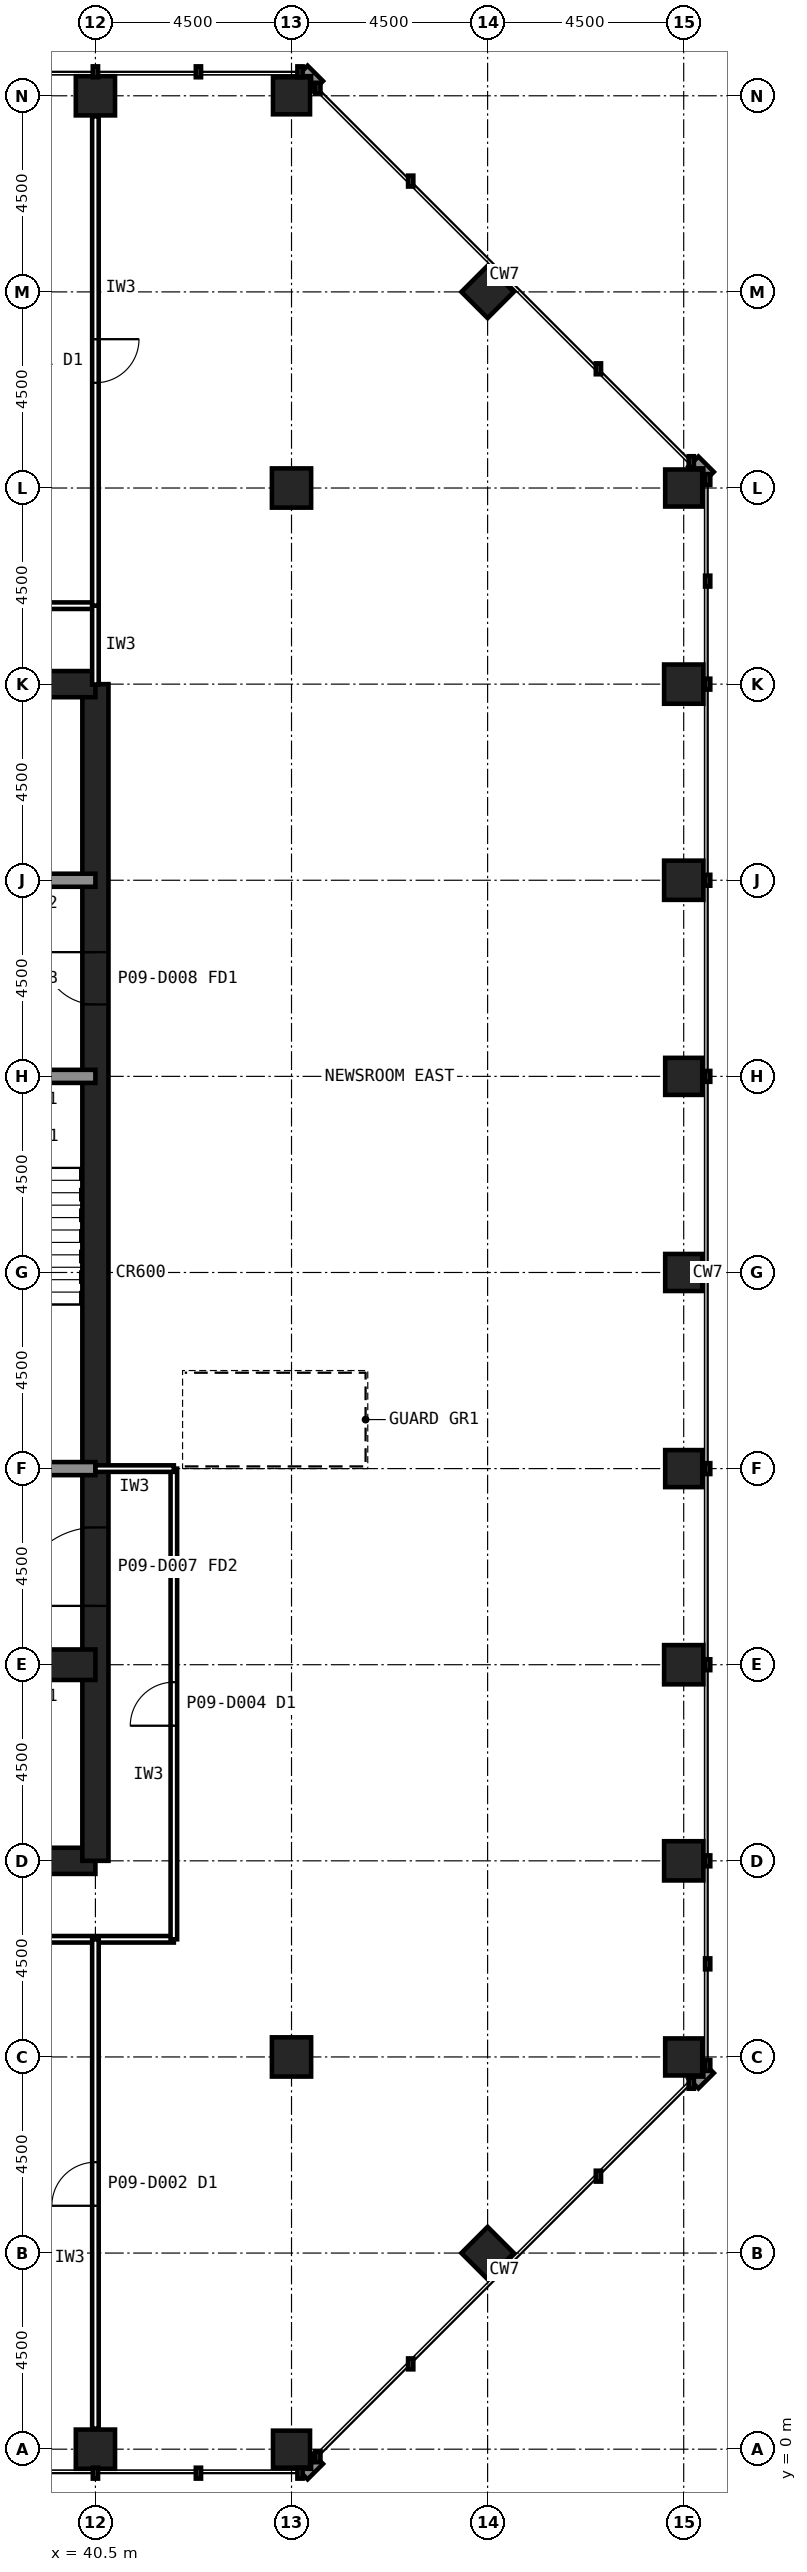
"""IFC4 building model, lengths in metres.
Left out: names, types, materials, properties, quantities, classifications, styles, units other than length and angle.
Written with IfcOpenShell. Run it as: python <this file> out.ifc"""

import sys

from ifc_helpers import new_model, si_unit, direction, frame, frame_2d, origin, origin_2d, place, context, subcontext, project, spatial, rectangle, hollow_rectangle, extrude, element, fill, save


model = new_model("IFC4")
c1 = context("Model", 3, precision=1e-05, world=origin(), true_north=direction((0.0, 1.0)))
c2 = subcontext(c1, "Body", "Model", "MODEL_VIEW")
j1 = project(units=[si_unit("LENGTHUNIT", "METRE"), si_unit("PLANEANGLEUNIT", "RADIAN")], contexts=[c1])
p1 = place(None, origin())
s1 = spatial("IfcSite", under=j1, at=p1, CompositionType="ELEMENT")
p2 = place(p1, origin())
s2 = spatial("IfcBuilding", under=s1, at=p2, CompositionType="ELEMENT")
p3 = place(p2, frame((0.0, 0.0, 41.6)))
s3 = spatial("IfcBuildingStorey", under=s2, at=p3, CompositionType="ELEMENT", Elevation=41.6)
p4 = place(p3, frame((40.5, 0.0, 0.0), z_axis=(0.0, 0.0, 1.0), x_axis=(1.0, 0.0, 0.0)))
e1 = element("IfcColumn", 1, at=p4, inside=s3, PredefinedType="COLUMN", context=c2, shape_type="SweptSolid", body=[
    extrude(hollow_rectangle(XDim=0.9, YDim=0.9, WallThickness=0.063, at=origin_2d()), origin(), (0.0, 0.0, 1.0), 4.2),
])
for number, where, z_axis, x_axis in (
    (2, (45.0, 0.0, 0.0), (0.0, 0.0, 1.0), (1.0, 0.0, 0.0)),
    (3, (54.0, 9.0, 0.0), (0.0, 0.0, 1.0), (1.0, 0.0, 0.0)),
):
    element("IfcColumn", number, at=place(p3, frame(where, z_axis=z_axis, x_axis=x_axis)), inside=s3, PredefinedType="COLUMN", context=c2, shape_type="SweptSolid", body=[
        extrude(hollow_rectangle(XDim=0.85, YDim=0.85, WallThickness=0.05, at=origin_2d()), origin(), (0.0, 0.0, 1.0), 4.2),
    ])
for number, where, z_axis, x_axis in (
    (4, (54.0, 13.5, 0.0), (0.0, 0.0, 1.0), (1.0, 0.0, 0.0)),
    (5, (54.0, 18.0, 0.0), (0.0, 0.0, 1.0), (1.0, 0.0, 0.0)),
):
    element("IfcColumn", number, at=place(p3, frame(where, z_axis=z_axis, x_axis=x_axis)), inside=s3, PredefinedType="COLUMN", context=c2, shape_type="SweptSolid", body=[
        extrude(hollow_rectangle(XDim=0.9, YDim=0.9, WallThickness=0.063, at=origin_2d()), origin(), (0.0, 0.0, 1.0), 4.2),
    ])
for number, where, z_axis, x_axis in (
    (6, (54.0, 22.5, 0.0), (0.0, 0.0, 1.0), (1.0, 0.0, 0.0)),
    (7, (54.0, 27.0, 0.0), (0.0, 0.0, 1.0), (1.0, 0.0, 0.0)),
    (8, (54.0, 31.5, 0.0), (0.0, 0.0, 1.0), (1.0, 0.0, 0.0)),
):
    element("IfcColumn", number, at=place(p3, frame(where, z_axis=z_axis, x_axis=x_axis)), inside=s3, PredefinedType="COLUMN", context=c2, shape_type="SweptSolid", body=[
        extrude(hollow_rectangle(XDim=0.85, YDim=0.85, WallThickness=0.05, at=origin_2d()), origin(), (0.0, 0.0, 1.0), 4.2),
    ])
for number, where, z_axis, x_axis in (
    (9, (54.0, 36.0, 0.0), (0.0, 0.0, 1.0), (1.0, 0.0, 0.0)),
    (10, (54.0, 40.5, 0.0), (0.0, 0.0, 1.0), (1.0, 0.0, 0.0)),
):
    element("IfcColumn", number, at=place(p3, frame(where, z_axis=z_axis, x_axis=x_axis)), inside=s3, PredefinedType="COLUMN", context=c2, shape_type="SweptSolid", body=[
        extrude(hollow_rectangle(XDim=0.9, YDim=0.9, WallThickness=0.063, at=origin_2d()), origin(), (0.0, 0.0, 1.0), 4.2),
    ])
for number, where, z_axis, x_axis in (
    (11, (54.0, 45.0, 0.0), (0.0, 0.0, 1.0), (1.0, 0.0, 0.0)),
    (12, (45.0, 54.0, 0.0), (0.0, 0.0, 1.0), (1.0, 0.0, 0.0)),
):
    element("IfcColumn", number, at=place(p3, frame(where, z_axis=z_axis, x_axis=x_axis)), inside=s3, PredefinedType="COLUMN", context=c2, shape_type="SweptSolid", body=[
        extrude(hollow_rectangle(XDim=0.85, YDim=0.85, WallThickness=0.05, at=origin_2d()), origin(), (0.0, 0.0, 1.0), 4.2),
    ])
p5 = place(p3, frame((40.5, 54.0, 0.0), z_axis=(0.0, 0.0, 1.0), x_axis=(1.0, 0.0, 0.0)))
e13 = element("IfcColumn", 13, at=p5, inside=s3, PredefinedType="COLUMN", context=c2, shape_type="SweptSolid", body=[
    extrude(hollow_rectangle(XDim=0.9, YDim=0.9, WallThickness=0.063, at=origin_2d()), origin(), (0.0, 0.0, 1.0), 4.2),
])
for number, where, z_axis, x_axis in (
    (14, (49.5, 4.5, 0.0), (0.0, 0.0, 1.0), (0.707, 0.707, 0.0)),
    (15, (49.5, 49.5, 0.0), (0.0, 0.0, 1.0), (0.707, 0.707, 0.0)),
):
    element("IfcColumn", number, at=place(p3, frame(where, z_axis=z_axis, x_axis=x_axis)), inside=s3, PredefinedType="COLUMN", context=c2, shape_type="SweptSolid", body=[
        extrude(hollow_rectangle(XDim=0.85, YDim=0.85, WallThickness=0.05, at=origin_2d()), origin(), (0.0, 0.0, 1.0), 4.2),
    ])
for number, where, z_axis, x_axis in (
    (16, (45.0, 9.0, 0.0), (0.0, 0.0, 1.0), (1.0, 0.0, 0.0)),
    (17, (45.0, 45.0, 0.0), (0.0, 0.0, 1.0), (1.0, 0.0, 0.0)),
):
    element("IfcColumn", number, at=place(p3, frame(where, z_axis=z_axis, x_axis=x_axis)), inside=s3, PredefinedType="COLUMN", context=c2, shape_type="SweptSolid", body=[
        extrude(hollow_rectangle(XDim=0.9, YDim=0.9, WallThickness=0.063, at=origin_2d()), origin(), (0.0, 0.0, 1.0), 4.2),
    ])
p6 = place(p3, frame((13.5, 13.5, 0.0), z_axis=(0.0, 0.0, 1.0), x_axis=(1.0, 0.0, 0.0)))
e18 = element("IfcWall", 18, at=p6, inside=s3, PredefinedType="SHEAR", context=c2, shape_type="SweptSolid", body=[
    extrude(rectangle(XDim=27.0, YDim=0.6, at=frame_2d((13.5, 0.0))), origin(), (0.0, 0.0, 1.0), 4.2),
])
p7 = place(p3, frame((40.5, 13.5, 0.0), z_axis=(0.0, 0.0, 1.0), x_axis=(0.0, 1.0, 0.0)))
e19 = element("IfcWall", 19, at=p7, inside=s3, PredefinedType="SHEAR", context=c2, shape_type="SweptSolid", body=[
    extrude(rectangle(XDim=27.0, YDim=0.6, at=frame_2d((13.5, 0.0))), origin(), (0.0, 0.0, 1.0), 4.2),
])
p8 = place(p7, frame((5.85, 0.0, 0.0)))
e20 = element("IfcOpeningElement", 20, at=p8, cuts=e19, PredefinedType="OPENING", context=c2, shape_type="SweptSolid", body=[
    extrude(rectangle(XDim=1.8, YDim=2.1, at=frame_2d((0.9, 1.05))), frame((0.0, 0.31, 0.0), z_axis=(0.0, -1.0, 0.0), x_axis=(1.0, 0.0, 0.0)), (0.0, 0.0, 1.0), 0.62),
])
p9 = place(p7, frame((19.65, 0.0, 0.0)))
e21 = element("IfcOpeningElement", 21, at=p9, cuts=e19, PredefinedType="OPENING", context=c2, shape_type="SweptSolid", body=[
    extrude(rectangle(XDim=1.2, YDim=2.1, at=frame_2d((0.6, 1.05))), frame((0.0, 0.31, 0.0), z_axis=(0.0, -1.0, 0.0), x_axis=(1.0, 0.0, 0.0)), (0.0, 0.0, 1.0), 0.62),
])
p10 = place(p3, frame((40.5, 40.5, 0.0), z_axis=(0.0, 0.0, 1.0), x_axis=(-1.0, 0.0, 0.0)))
e22 = element("IfcWall", 22, at=p10, inside=s3, PredefinedType="SHEAR", context=c2, shape_type="SweptSolid", body=[
    extrude(rectangle(XDim=27.0, YDim=0.6, at=frame_2d((13.5, 0.0))), origin(), (0.0, 0.0, 1.0), 4.2),
])
p11 = place(p3, frame((13.5, 18.0, 0.0), z_axis=(0.0, 0.0, 1.0), x_axis=(1.0, 0.0, 0.0)))
e23 = element("IfcWall", 23, at=p11, inside=s3, PredefinedType="SHEAR", context=c2, shape_type="SweptSolid", body=[
    extrude(rectangle(XDim=27.0, YDim=0.7, at=frame_2d((13.5, 0.0))), origin(), (0.0, 0.0, 1.0), 4.2),
])
p12 = place(p11, frame((24.3, 0.0, 0.0)))
e24 = element("IfcOpeningElement", 24, at=p12, cuts=e23, PredefinedType="OPENING", context=c2, shape_type="SweptSolid", body=[
    extrude(rectangle(XDim=0.9, YDim=2.1, at=frame_2d((0.45, 1.05))), frame((0.0, 0.36, 0.0), z_axis=(0.0, -1.0, 0.0), x_axis=(1.0, 0.0, 0.0)), (0.0, 0.0, 1.0), 0.72),
])
p13 = place(p11, frame((5.45, 0.0, 0.0)))
e25 = element("IfcOpeningElement", 25, at=p13, cuts=e23, PredefinedType="OPENING", context=c2, shape_type="SweptSolid", body=[
    extrude(rectangle(XDim=1.1, YDim=2.1, at=frame_2d((0.55, 1.05))), frame((0.0, 0.36, 0.0), z_axis=(0.0, -1.0, 0.0), x_axis=(1.0, 0.0, 0.0)), (0.0, 0.0, 1.0), 0.72),
])
p14 = place(p11, frame((8.45, 0.0, 0.0)))
e26 = element("IfcOpeningElement", 26, at=p14, cuts=e23, PredefinedType="OPENING", context=c2, shape_type="SweptSolid", body=[
    extrude(rectangle(XDim=1.1, YDim=2.1, at=frame_2d((0.55, 1.05))), frame((0.0, 0.36, 0.0), z_axis=(0.0, -1.0, 0.0), x_axis=(1.0, 0.0, 0.0)), (0.0, 0.0, 1.0), 0.72),
])
p15 = place(p11, frame((11.45, 0.0, 0.0)))
e27 = element("IfcOpeningElement", 27, at=p15, cuts=e23, PredefinedType="OPENING", context=c2, shape_type="SweptSolid", body=[
    extrude(rectangle(XDim=1.1, YDim=2.1, at=frame_2d((0.55, 1.05))), frame((0.0, 0.36, 0.0), z_axis=(0.0, -1.0, 0.0), x_axis=(1.0, 0.0, 0.0)), (0.0, 0.0, 1.0), 0.72),
])
p16 = place(p11, frame((14.45, 0.0, 0.0)))
e28 = element("IfcOpeningElement", 28, at=p16, cuts=e23, PredefinedType="OPENING", context=c2, shape_type="SweptSolid", body=[
    extrude(rectangle(XDim=1.1, YDim=2.1, at=frame_2d((0.55, 1.05))), frame((0.0, 0.36, 0.0), z_axis=(0.0, -1.0, 0.0), x_axis=(1.0, 0.0, 0.0)), (0.0, 0.0, 1.0), 0.72),
])
p17 = place(p11, frame((17.45, 0.0, 0.0)))
e29 = element("IfcOpeningElement", 29, at=p17, cuts=e23, PredefinedType="OPENING", context=c2, shape_type="SweptSolid", body=[
    extrude(rectangle(XDim=1.1, YDim=2.1, at=frame_2d((0.55, 1.05))), frame((0.0, 0.36, 0.0), z_axis=(0.0, -1.0, 0.0), x_axis=(1.0, 0.0, 0.0)), (0.0, 0.0, 1.0), 0.72),
])
p18 = place(p11, frame((20.45, 0.0, 0.0)))
e30 = element("IfcOpeningElement", 30, at=p18, cuts=e23, PredefinedType="OPENING", context=c2, shape_type="SweptSolid", body=[
    extrude(rectangle(XDim=1.1, YDim=2.1, at=frame_2d((0.55, 1.05))), frame((0.0, 0.36, 0.0), z_axis=(0.0, -1.0, 0.0), x_axis=(1.0, 0.0, 0.0)), (0.0, 0.0, 1.0), 0.72),
])
p19 = place(p11, frame((1.6, 0.0, 0.0)))
e31 = element("IfcOpeningElement", 31, at=p19, cuts=e23, PredefinedType="OPENING", context=c2, shape_type="SweptSolid", body=[
    extrude(rectangle(XDim=1.3, YDim=2.2, at=frame_2d((0.65, 1.1))), frame((0.0, 0.36, 0.0), z_axis=(0.0, -1.0, 0.0), x_axis=(1.0, 0.0, 0.0)), (0.0, 0.0, 1.0), 0.72),
])
p20 = place(p3, frame((13.5, 36.0, 0.0), z_axis=(0.0, 0.0, 1.0), x_axis=(1.0, 0.0, 0.0)))
e32 = element("IfcWall", 32, at=p20, inside=s3, PredefinedType="SOLIDWALL", context=c2, shape_type="SweptSolid", body=[
    extrude(rectangle(XDim=27.0, YDim=0.3, at=frame_2d((13.5, 0.0))), origin(), (0.0, 0.0, 1.0), 4.04),
])
p21 = place(p20, frame((1.8, 0.0, 0.0)))
e33 = element("IfcOpeningElement", 33, at=p21, cuts=e32, PredefinedType="OPENING", context=c2, shape_type="SweptSolid", body=[
    extrude(rectangle(XDim=0.9, YDim=2.1, at=frame_2d((0.45, 1.05))), frame((0.0, 0.16, 0.0), z_axis=(0.0, -1.0, 0.0), x_axis=(1.0, 0.0, 0.0)), (0.0, 0.0, 1.0), 0.32),
])
p22 = place(p20, frame((24.1, 0.0, 0.0)))
e34 = element("IfcOpeningElement", 34, at=p22, cuts=e32, PredefinedType="OPENING", context=c2, shape_type="SweptSolid", body=[
    extrude(rectangle(XDim=1.3, YDim=2.2, at=frame_2d((0.65, 1.1))), frame((0.0, 0.16, 0.0), z_axis=(0.0, -1.0, 0.0), x_axis=(1.0, 0.0, 0.0)), (0.0, 0.0, 1.0), 0.32),
])
p23 = place(p3, frame((13.5, 22.5, 0.0), z_axis=(0.0, 0.0, 1.0), x_axis=(1.0, 0.0, 0.0)))
e35 = element("IfcWall", 35, at=p23, inside=s3, PredefinedType="SOLIDWALL", context=c2, shape_type="SweptSolid", body=[
    extrude(rectangle(XDim=27.0, YDim=0.3, at=frame_2d((13.5, 0.0))), origin(), (0.0, 0.0, 1.0), 4.04),
])
p24 = place(p23, frame((1.65, 0.0, 0.0)))
e36 = element("IfcOpeningElement", 36, at=p24, cuts=e35, PredefinedType="OPENING", context=c2, shape_type="SweptSolid", body=[
    extrude(rectangle(XDim=1.2, YDim=2.1, at=frame_2d((0.6, 1.05))), frame((0.0, 0.16, 0.0), z_axis=(0.0, -1.0, 0.0), x_axis=(1.0, 0.0, 0.0)), (0.0, 0.0, 1.0), 0.32),
])
p25 = place(p23, frame((6.025, 0.0, 0.0)))
e37 = element("IfcOpeningElement", 37, at=p25, cuts=e35, PredefinedType="OPENING", context=c2, shape_type="SweptSolid", body=[
    extrude(rectangle(XDim=1.0, YDim=2.1, at=frame_2d((0.5, 1.05))), frame((0.0, 0.16, 0.0), z_axis=(0.0, -1.0, 0.0), x_axis=(1.0, 0.0, 0.0)), (0.0, 0.0, 1.0), 0.32),
])
p26 = place(p23, frame((10.525, 0.0, 0.0)))
e38 = element("IfcOpeningElement", 38, at=p26, cuts=e35, PredefinedType="OPENING", context=c2, shape_type="SweptSolid", body=[
    extrude(rectangle(XDim=1.0, YDim=2.1, at=frame_2d((0.5, 1.05))), frame((0.0, 0.16, 0.0), z_axis=(0.0, -1.0, 0.0), x_axis=(1.0, 0.0, 0.0)), (0.0, 0.0, 1.0), 0.32),
])
p27 = place(p23, frame((19.75, 0.0, 0.0)))
e39 = element("IfcOpeningElement", 39, at=p27, cuts=e35, PredefinedType="OPENING", context=c2, shape_type="SweptSolid", body=[
    extrude(rectangle(XDim=1.0, YDim=2.1, at=frame_2d((0.5, 1.05))), frame((0.0, 0.16, 0.0), z_axis=(0.0, -1.0, 0.0), x_axis=(1.0, 0.0, 0.0)), (0.0, 0.0, 1.0), 0.32),
])
p28 = place(p23, frame((15.05, 0.0, 0.0)))
e40 = element("IfcOpeningElement", 40, at=p28, cuts=e35, PredefinedType="OPENING", context=c2, shape_type="SweptSolid", body=[
    extrude(rectangle(XDim=1.4, YDim=2.4, at=frame_2d((0.7, 1.2))), frame((0.0, 0.16, 0.0), z_axis=(0.0, -1.0, 0.0), x_axis=(1.0, 0.0, 0.0)), (0.0, 0.0, 1.0), 0.32),
])
p29 = place(p3, frame((13.5, 31.5, 0.0), z_axis=(0.0, 0.0, 1.0), x_axis=(1.0, 0.0, 0.0)))
e41 = element("IfcWall", 41, at=p29, inside=s3, PredefinedType="SOLIDWALL", context=c2, shape_type="SweptSolid", body=[
    extrude(rectangle(XDim=27.0, YDim=0.3, at=frame_2d((13.5, 0.0))), origin(), (0.0, 0.0, 1.0), 4.04),
])
p30 = place(p29, frame((24.15, 0.0, 0.0)))
e42 = element("IfcOpeningElement", 42, at=p30, cuts=e41, PredefinedType="OPENING", context=c2, shape_type="SweptSolid", body=[
    extrude(rectangle(XDim=1.2, YDim=2.1, at=frame_2d((0.6, 1.05))), frame((0.0, 0.16, 0.0), z_axis=(0.0, -1.0, 0.0), x_axis=(1.0, 0.0, 0.0)), (0.0, 0.0, 1.0), 0.32),
])
p31 = place(p29, frame((15.3, 0.0, 0.0)))
e43 = element("IfcOpeningElement", 43, at=p31, cuts=e41, PredefinedType="OPENING", context=c2, shape_type="SweptSolid", body=[
    extrude(rectangle(XDim=0.9, YDim=2.1, at=frame_2d((0.45, 1.05))), frame((0.0, 0.16, 0.0), z_axis=(0.0, -1.0, 0.0), x_axis=(1.0, 0.0, 0.0)), (0.0, 0.0, 1.0), 0.32),
])
p32 = place(p29, frame((19.8, 0.0, 0.0)))
e44 = element("IfcOpeningElement", 44, at=p32, cuts=e41, PredefinedType="OPENING", context=c2, shape_type="SweptSolid", body=[
    extrude(rectangle(XDim=0.9, YDim=2.1, at=frame_2d((0.45, 1.05))), frame((0.0, 0.16, 0.0), z_axis=(0.0, -1.0, 0.0), x_axis=(1.0, 0.0, 0.0)), (0.0, 0.0, 1.0), 0.32),
])
p33 = place(p3, frame((11.7, 11.7, 0.0), z_axis=(0.0, 0.0, 1.0), x_axis=(1.0, 0.0, 0.0)))
e45 = element("IfcWall", 45, at=p33, inside=s3, PredefinedType="PARTITIONING", context=c2, shape_type="SweptSolid", body=[
    extrude(rectangle(XDim=30.6, YDim=0.15, at=frame_2d((15.3, 0.0))), origin(), (0.0, 0.0, 1.0), 4.04),
])
p34 = place(p33, frame((14.8, 0.0, 0.0)))
e46 = element("IfcOpeningElement", 46, at=p34, cuts=e45, PredefinedType="OPENING", context=c2, shape_type="SweptSolid", body=[
    extrude(rectangle(XDim=1.0, YDim=2.1, at=frame_2d((0.5, 1.05))), frame((0.0, 0.085, 0.0), z_axis=(0.0, -1.0, 0.0), x_axis=(1.0, 0.0, 0.0)), (0.0, 0.0, 1.0), 0.17),
])
p35 = place(p3, frame((42.3, 11.7, 0.0), z_axis=(0.0, 0.0, 1.0), x_axis=(0.0, 1.0, 0.0)))
e47 = element("IfcWall", 47, at=p35, inside=s3, PredefinedType="PARTITIONING", context=c2, shape_type="SweptSolid", body=[
    extrude(rectangle(XDim=10.8, YDim=0.15, at=frame_2d((5.4, 0.0))), origin(), (0.0, 0.0, 1.0), 4.04),
])
p36 = place(p35, frame((4.9, 0.0, 0.0)))
e48 = element("IfcOpeningElement", 48, at=p36, cuts=e47, PredefinedType="OPENING", context=c2, shape_type="SweptSolid", body=[
    extrude(rectangle(XDim=1.0, YDim=2.1, at=frame_2d((0.5, 1.05))), frame((0.0, 0.085, 0.0), z_axis=(0.0, -1.0, 0.0), x_axis=(1.0, 0.0, 0.0)), (0.0, 0.0, 1.0), 0.17),
])
p37 = place(p3, frame((40.5, 42.3, 0.0), z_axis=(0.0, 0.0, 1.0), x_axis=(-1.0, 0.0, 0.0)))
e49 = element("IfcWall", 49, at=p37, inside=s3, PredefinedType="PARTITIONING", context=c2, shape_type="SweptSolid", body=[
    extrude(rectangle(XDim=2.7, YDim=0.15, at=frame_2d((1.35, 0.0))), origin(), (0.0, 0.0, 1.0), 4.04),
])
p38 = place(p3, frame((40.5, 40.49, 0.0), z_axis=(0.0, 0.0, 1.0), x_axis=(0.0, 1.0, 0.0)))
e50 = element("IfcWall", 50, at=p38, inside=s3, PredefinedType="PARTITIONING", context=c2, shape_type="SweptSolid", body=[
    extrude(rectangle(XDim=1.81, YDim=0.15, at=frame_2d((0.905, 0.0))), origin(), (0.0, 0.0, 1.0), 3.189),
])
p39 = place(p3, frame((42.3, 22.5, 0.0), z_axis=(0.0, 0.0, 1.0), x_axis=(-1.0, 0.0, 0.0)))
e51 = element("IfcWall", 51, at=p39, inside=s3, PredefinedType="PARTITIONING", context=c2, shape_type="SweptSolid", body=[
    extrude(rectangle(XDim=1.8, YDim=0.15, at=frame_2d((0.9, 0.0))), origin(), (0.0, 0.0, 1.0), 3.189),
])
p40 = place(p3, frame((40.5, 53.53, 0.0), z_axis=(0.0, 0.0, 1.0), x_axis=(0.0, -1.0, 0.0)))
e52 = element("IfcWall", 52, at=p40, inside=s3, PredefinedType="PARTITIONING", context=c2, shape_type="SweptSolid", body=[
    extrude(rectangle(XDim=11.23, YDim=0.15, at=frame_2d((5.615, 0.0))), origin(), (0.0, 0.0, 1.0), 3.189),
])
p41 = place(p40, frame((5.115, 0.0, 0.0)))
e53 = element("IfcOpeningElement", 53, at=p41, cuts=e52, PredefinedType="OPENING", context=c2, shape_type="SweptSolid", body=[
    extrude(rectangle(XDim=1.0, YDim=2.1, at=frame_2d((0.5, 1.05))), frame((0.0, 0.085, 0.0), z_axis=(0.0, -1.0, 0.0), x_axis=(1.0, 0.0, 0.0)), (0.0, 0.0, 1.0), 0.17),
])
p42 = place(p3, frame((40.5, 0.47, 0.0), z_axis=(0.0, 0.0, 1.0), x_axis=(0.0, 1.0, 0.0)))
e54 = element("IfcWall", 54, at=p42, inside=s3, PredefinedType="PARTITIONING", context=c2, shape_type="SweptSolid", body=[
    extrude(rectangle(XDim=11.23, YDim=0.15, at=frame_2d((5.615, 0.0))), origin(), (0.0, 0.0, 1.0), 3.189),
])
p43 = place(p42, frame((5.115, 0.0, 0.0)))
e55 = element("IfcOpeningElement", 55, at=p43, cuts=e54, PredefinedType="OPENING", context=c2, shape_type="SweptSolid", body=[
    extrude(rectangle(XDim=1.0, YDim=2.1, at=frame_2d((0.5, 1.05))), frame((0.0, 0.085, 0.0), z_axis=(0.0, -1.0, 0.0), x_axis=(1.0, 0.0, 0.0)), (0.0, 0.0, 1.0), 0.17),
])
p44 = place(p8, origin())
e56 = element("IfcDoor", 56, at=p44, inside=s3, OperationType="SINGLE_SWING_LEFT", PredefinedType="DOOR", context=c2, shape_type="SweptSolid", body=[
    extrude(rectangle(XDim=1.8, YDim=2.1, at=frame_2d((0.9, 1.05))), frame((0.0, 0.025, 0.0), z_axis=(0.0, -1.0, 0.0), x_axis=(1.0, 0.0, 0.0)), (0.0, 0.0, 1.0), 0.05),
])
fill(e20, e56)
p45 = place(p9, origin())
e57 = element("IfcDoor", 57, at=p45, inside=s3, OperationType="SINGLE_SWING_RIGHT", PredefinedType="DOOR", context=c2, shape_type="SweptSolid", body=[
    extrude(rectangle(XDim=1.2, YDim=2.1, at=frame_2d((0.6, 1.05))), frame((0.0, 0.025, 0.0), z_axis=(0.0, -1.0, 0.0), x_axis=(1.0, 0.0, 0.0)), (0.0, 0.0, 1.0), 0.05),
])
fill(e21, e57)
p46 = place(p36, origin())
e58 = element("IfcDoor", 58, at=p46, inside=s3, OperationType="SINGLE_SWING_LEFT", PredefinedType="DOOR", context=c2, shape_type="SweptSolid", body=[
    extrude(rectangle(XDim=1.0, YDim=2.1, at=frame_2d((0.5, 1.05))), frame((0.0, 0.025, 0.0), z_axis=(0.0, -1.0, 0.0), x_axis=(1.0, 0.0, 0.0)), (0.0, 0.0, 1.0), 0.05),
])
fill(e48, e58)
p47 = place(p41, origin())
e59 = element("IfcDoor", 59, at=p47, inside=s3, OperationType="SINGLE_SWING_LEFT", PredefinedType="DOOR", context=c2, shape_type="SweptSolid", body=[
    extrude(rectangle(XDim=1.0, YDim=2.1, at=frame_2d((0.5, 1.05))), frame((0.0, 0.025, 0.0), z_axis=(0.0, -1.0, 0.0), x_axis=(1.0, 0.0, 0.0)), (0.0, 0.0, 1.0), 0.05),
])
fill(e53, e59)
p48 = place(p43, origin())
e60 = element("IfcDoor", 60, at=p48, inside=s3, OperationType="SINGLE_SWING_LEFT", PredefinedType="DOOR", context=c2, shape_type="SweptSolid", body=[
    extrude(rectangle(XDim=1.0, YDim=2.1, at=frame_2d((0.5, 1.05))), frame((0.0, 0.025, 0.0), z_axis=(0.0, -1.0, 0.0), x_axis=(1.0, 0.0, 0.0)), (0.0, 0.0, 1.0), 0.05),
])
fill(e55, e60)
save(model, sys.argv[1])
